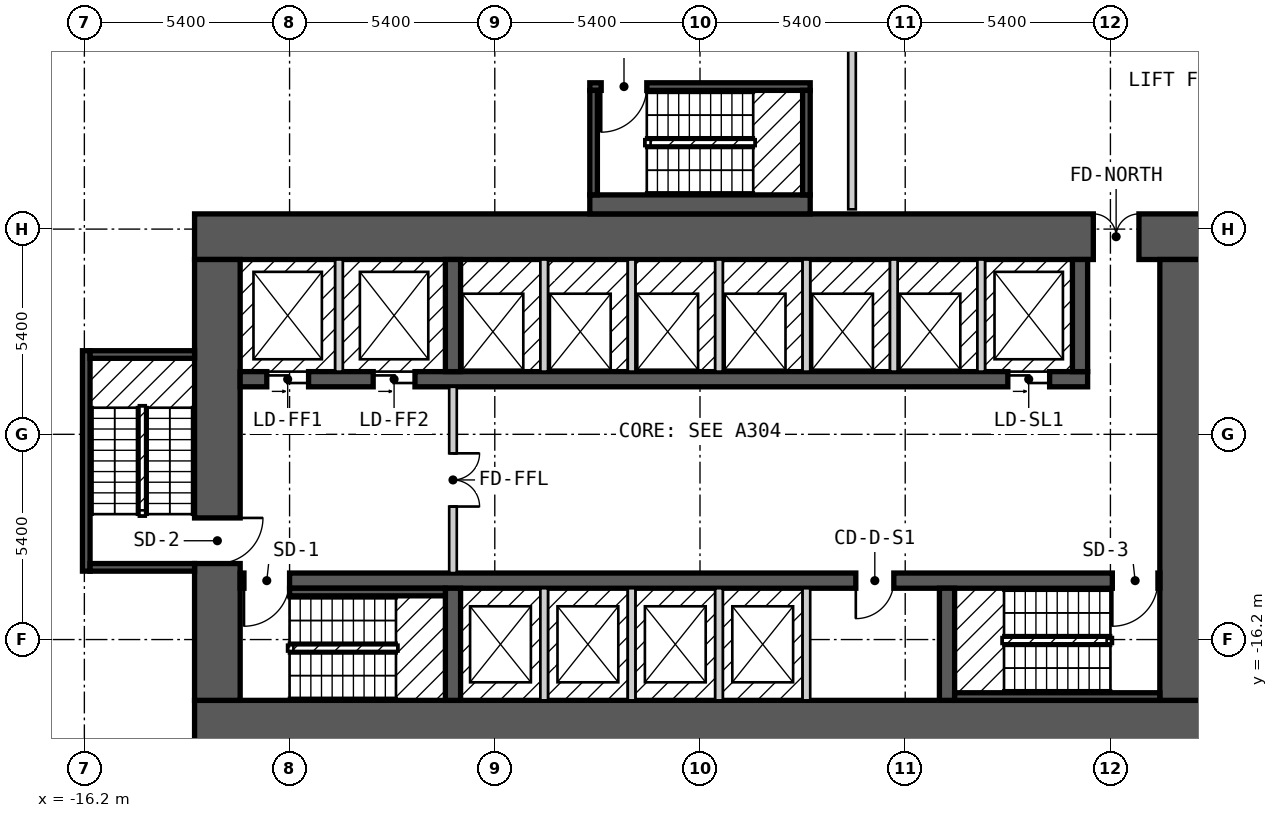
"""IFC4 building model, lengths in metres.
Left out: names, types, materials, properties, quantities, classifications, styles, units other than length and angle.
Written with IfcOpenShell. Run it as: python <this file> out.ifc"""

import sys

from ifc_helpers import new_model, si_unit, direction, frame, frame_2d, origin, place, context, subcontext, project, spatial, rectangle, extrude, element, fill, save


model = new_model("IFC4")
c1 = context("Model", 3, precision=1e-05, world=origin(), true_north=direction((0.0, 1.0)))
c2 = subcontext(c1, "Body", "Model", "MODEL_VIEW")
j1 = project(units=[si_unit("LENGTHUNIT", "METRE"), si_unit("PLANEANGLEUNIT", "RADIAN")], contexts=[c1])
p1 = place(None, origin())
s1 = spatial("IfcSite", under=j1, at=p1, CompositionType="ELEMENT")
p2 = place(p1, origin())
s2 = spatial("IfcBuilding", under=s1, at=p2, CompositionType="ELEMENT")
p3 = place(p2, frame((0.0, 0.0, 5.0)))
s3 = spatial("IfcBuildingStorey", under=s2, at=p3, CompositionType="ELEMENT", Elevation=5.0)
p4 = place(p3, frame((-13.3, -18.4, 0.0), z_axis=(0.0, 0.0, 1.0), x_axis=(1.0, 0.0, 0.0)))
e1 = element("IfcWall", 1, at=p4, inside=s3, PredefinedType="SHEAR", context=c2, shape_type="SweptSolid", body=[
    extrude(rectangle(XDim=26.6, YDim=1.2, at=frame_2d((13.3, 0.0))), origin(), (0.0, 0.0, 1.0), 3.5),
])
p5 = place(p3, frame((-13.3, -5.6, 0.0), z_axis=(0.0, 0.0, 1.0), x_axis=(1.0, 0.0, 0.0)))
e2 = element("IfcWall", 2, at=p5, inside=s3, PredefinedType="SHEAR", context=c2, shape_type="SweptSolid", body=[
    extrude(rectangle(XDim=26.6, YDim=1.2, at=frame_2d((13.3, 0.0))), origin(), (0.0, 0.0, 1.0), 3.5),
])
p6 = place(p5, frame((23.65, 0.0, 0.0)))
e3 = element("IfcOpeningElement", 3, at=p6, cuts=e2, PredefinedType="OPENING", context=c2, shape_type="SweptSolid", body=[
    extrude(rectangle(XDim=1.2, YDim=2.1, at=frame_2d((0.6, 1.05))), frame((0.0, 0.61, 0.0), z_axis=(0.0, -1.0, 0.0), x_axis=(1.0, 0.0, 0.0)), (0.0, 0.0, 1.0), 1.22),
])
p7 = place(p3, frame((-12.7, -17.8, 0.0), z_axis=(0.0, 0.0, 1.0), x_axis=(0.0, 1.0, 0.0)))
e4 = element("IfcWall", 4, at=p7, inside=s3, PredefinedType="SHEAR", context=c2, shape_type="SweptSolid", body=[
    extrude(rectangle(XDim=11.6, YDim=1.2, at=frame_2d((5.8, 0.0))), origin(), (0.0, 0.0, 1.0), 3.5),
])
p8 = place(p7, frame((3.6, 0.0, 0.0)))
e5 = element("IfcOpeningElement", 5, at=p8, cuts=e4, PredefinedType="OPENING", context=c2, shape_type="SweptSolid", body=[
    extrude(rectangle(XDim=1.2, YDim=2.1, at=frame_2d((0.6, 1.05))), frame((0.0, 0.61, 0.0), z_axis=(0.0, -1.0, 0.0), x_axis=(1.0, 0.0, 0.0)), (0.0, 0.0, 1.0), 1.22),
])
p9 = place(p3, frame((12.7, -17.8, 0.0), z_axis=(0.0, 0.0, 1.0), x_axis=(0.0, 1.0, 0.0)))
e6 = element("IfcWall", 6, at=p9, inside=s3, PredefinedType="SHEAR", context=c2, shape_type="SweptSolid", body=[
    extrude(rectangle(XDim=11.6, YDim=1.2, at=frame_2d((5.8, 0.0))), origin(), (0.0, 0.0, 1.0), 3.5),
])
p10 = place(p3, frame((-12.1, -14.65, 0.0), z_axis=(0.0, 0.0, 1.0), x_axis=(1.0, 0.0, 0.0)))
e7 = element("IfcWall", 7, at=p10, inside=s3, PredefinedType="SHEAR", context=c2, shape_type="SweptSolid", body=[
    extrude(rectangle(XDim=24.2, YDim=0.4, at=frame_2d((12.1, 0.0))), origin(), (0.0, 0.0, 1.0), 3.5),
])
p11 = place(p10, frame((1.3, 0.0, 0.0), z_axis=(0.0, 0.0, 1.0), x_axis=(-1.0, 0.0, 0.0)))
e8 = element("IfcOpeningElement", 8, at=p11, cuts=e7, PredefinedType="OPENING", context=c2, shape_type="SweptSolid", body=[
    extrude(rectangle(XDim=1.2, YDim=2.1, at=frame_2d((0.6, 1.05))), frame((0.0, 0.21, 0.0), z_axis=(0.0, -1.0, 0.0), x_axis=(1.0, 0.0, 0.0)), (0.0, 0.0, 1.0), 0.42),
])
p12 = place(p10, frame((24.15, 0.0, 0.0), z_axis=(0.0, 0.0, 1.0), x_axis=(-1.0, 0.0, 0.0)))
e9 = element("IfcOpeningElement", 9, at=p12, cuts=e7, PredefinedType="OPENING", context=c2, shape_type="SweptSolid", body=[
    extrude(rectangle(XDim=1.2, YDim=2.1, at=frame_2d((0.6, 1.05))), frame((0.0, 0.21, 0.0), z_axis=(0.0, -1.0, 0.0), x_axis=(1.0, 0.0, 0.0)), (0.0, 0.0, 1.0), 0.42),
])
p13 = place(p10, frame((17.2, 0.0, 0.0), z_axis=(0.0, 0.0, 1.0), x_axis=(-1.0, 0.0, 0.0)))
e10 = element("IfcOpeningElement", 10, at=p13, cuts=e7, PredefinedType="OPENING", context=c2, shape_type="SweptSolid", body=[
    extrude(rectangle(XDim=1.0, YDim=2.1, at=frame_2d((0.5, 1.05))), frame((0.0, 0.21, 0.0), z_axis=(0.0, -1.0, 0.0), x_axis=(1.0, 0.0, 0.0)), (0.0, 0.0, 1.0), 0.42),
])
p14 = place(p3, frame((-12.1, -9.35, 0.0), z_axis=(0.0, 0.0, 1.0), x_axis=(1.0, 0.0, 0.0)))
e11 = element("IfcWall", 11, at=p14, inside=s3, PredefinedType="SHEAR", context=c2, shape_type="SweptSolid", body=[
    extrude(rectangle(XDim=22.3, YDim=0.4, at=frame_2d((11.15, 0.0))), origin(), (0.0, 0.0, 1.0), 3.5),
])
p15 = place(p14, frame((0.7, 0.0, 0.0)))
e12 = element("IfcOpeningElement", 12, at=p15, cuts=e11, PredefinedType="OPENING", context=c2, shape_type="SweptSolid", body=[
    extrude(rectangle(XDim=1.1, YDim=2.1, at=frame_2d((0.55, 1.05))), frame((0.0, 0.21, 0.0), z_axis=(0.0, -1.0, 0.0), x_axis=(1.0, 0.0, 0.0)), (0.0, 0.0, 1.0), 0.42),
])
p16 = place(p14, frame((3.5, 0.0, 0.0)))
e13 = element("IfcOpeningElement", 13, at=p16, cuts=e11, PredefinedType="OPENING", context=c2, shape_type="SweptSolid", body=[
    extrude(rectangle(XDim=1.1, YDim=2.1, at=frame_2d((0.55, 1.05))), frame((0.0, 0.21, 0.0), z_axis=(0.0, -1.0, 0.0), x_axis=(1.0, 0.0, 0.0)), (0.0, 0.0, 1.0), 0.42),
])
p17 = place(p14, frame((20.2, 0.0, 0.0)))
e14 = element("IfcOpeningElement", 14, at=p17, cuts=e11, PredefinedType="OPENING", context=c2, shape_type="SweptSolid", body=[
    extrude(rectangle(XDim=1.1, YDim=2.1, at=frame_2d((0.55, 1.05))), frame((0.0, 0.21, 0.0), z_axis=(0.0, -1.0, 0.0), x_axis=(1.0, 0.0, 0.0)), (0.0, 0.0, 1.0), 0.42),
])
for number, where, z_axis, x_axis in (
    (15, (-6.5, -17.8, 0.0), (0.0, 0.0, 1.0), (0.0, 1.0, 0.0)),
    (16, (6.5, -17.8, 0.0), (0.0, 0.0, 1.0), (0.0, 1.0, 0.0)),
    (17, (-6.5, -9.15, 0.0), (0.0, 0.0, 1.0), (0.0, 1.0, 0.0)),
    (18, (10.0, -9.15, 0.0), (0.0, 0.0, 1.0), (0.0, 1.0, 0.0)),
):
    element("IfcWall", number, at=place(p3, frame(where, z_axis=z_axis, x_axis=x_axis)), inside=s3, PredefinedType="SHEAR", context=c2, shape_type="SweptSolid", body=[
        extrude(rectangle(XDim=2.95, YDim=0.4, at=frame_2d((1.475, 0.0))), origin(), (0.0, 0.0, 1.0), 3.5),
    ])
p18 = place(p3, frame((-2.9, -4.75, 0.0), z_axis=(0.0, 0.0, 1.0), x_axis=(1.0, 0.0, 0.0)))
e19 = element("IfcWall", 19, at=p18, inside=s3, PredefinedType="SOLIDWALL", context=c2, shape_type="SweptSolid", body=[
    extrude(rectangle(XDim=5.8, YDim=0.5, at=frame_2d((2.9, 0.0))), origin(), (0.0, 0.0, 1.0), 3.5),
])
p19 = place(p3, frame((-2.9, -1.65, 0.0), z_axis=(0.0, 0.0, 1.0), x_axis=(1.0, 0.0, 0.0)))
e20 = element("IfcWall", 20, at=p19, inside=s3, PredefinedType="SOLIDWALL", context=c2, shape_type="SweptSolid", body=[
    extrude(rectangle(XDim=5.8, YDim=0.2, at=frame_2d((2.9, 0.0))), origin(), (0.0, 0.0, 1.0), 3.5),
])
p20 = place(p19, frame((0.3, 0.0, 0.0)))
e21 = element("IfcOpeningElement", 21, at=p20, cuts=e20, PredefinedType="OPENING", context=c2, shape_type="SweptSolid", body=[
    extrude(rectangle(XDim=1.2, YDim=2.1, at=frame_2d((0.6, 1.05))), frame((0.0, 0.11, 0.0), z_axis=(0.0, -1.0, 0.0), x_axis=(1.0, 0.0, 0.0)), (0.0, 0.0, 1.0), 0.22),
])
for number, where, z_axis, x_axis in (
    (22, (-2.8, -4.5, 0.0), (0.0, 0.0, 1.0), (0.0, 1.0, 0.0)),
    (23, (2.8, -4.5, 0.0), (0.0, 0.0, 1.0), (0.0, 1.0, 0.0)),
):
    element("IfcWall", number, at=place(p3, frame(where, z_axis=z_axis, x_axis=x_axis)), inside=s3, PredefinedType="SOLIDWALL", context=c2, shape_type="SweptSolid", body=[
        extrude(rectangle(XDim=2.75, YDim=0.2, at=frame_2d((1.375, 0.0))), origin(), (0.0, 0.0, 1.0), 3.5),
    ])
p21 = place(p3, frame((4.0, -4.88, 0.0), z_axis=(0.0, 0.0, 1.0), x_axis=(0.0, 1.0, 0.0)))
e24 = element("IfcWall", 24, at=p21, inside=s3, PredefinedType="PARTITIONING", context=c2, shape_type="SweptSolid", body=[
    extrude(rectangle(XDim=6.78, YDim=0.2, at=frame_2d((3.39, 0.0))), origin(), (0.0, 0.0, 1.0), 3.5),
])
p22 = place(p3, frame((-16.15, -14.4, 0.0), z_axis=(0.0, 0.0, 1.0), x_axis=(0.0, 1.0, 0.0)))
e25 = element("IfcWall", 25, at=p22, inside=s3, PredefinedType="SOLIDWALL", context=c2, shape_type="SweptSolid", body=[
    extrude(rectangle(XDim=5.8, YDim=0.2, at=frame_2d((2.9, 0.0))), origin(), (0.0, 0.0, 1.0), 3.5),
])
for number, where, z_axis, x_axis in (
    (26, (-16.05, -14.3, 0.0), (0.0, 0.0, 1.0), (1.0, 0.0, 0.0)),
    (27, (-16.05, -8.7, 0.0), (0.0, 0.0, 1.0), (1.0, 0.0, 0.0)),
):
    element("IfcWall", number, at=place(p3, frame(where, z_axis=z_axis, x_axis=x_axis)), inside=s3, PredefinedType="SOLIDWALL", context=c2, shape_type="SweptSolid", body=[
        extrude(rectangle(XDim=2.75, YDim=0.2, at=frame_2d((1.375, 0.0))), origin(), (0.0, 0.0, 1.0), 3.5),
    ])
p23 = place(p3, frame((-10.8, -14.95, 0.0), z_axis=(0.0, 0.0, 1.0), x_axis=(1.0, 0.0, 0.0)))
e28 = element("IfcWall", 28, at=p23, inside=s3, PredefinedType="SOLIDWALL", context=c2, shape_type="SweptSolid", body=[
    extrude(rectangle(XDim=4.1, YDim=0.2, at=frame_2d((2.05, 0.0))), origin(), (0.0, 0.0, 1.0), 3.5),
])
p24 = place(p3, frame((-9.5, -9.15, 0.0), z_axis=(0.0, 0.0, 1.0), x_axis=(0.0, 1.0, 0.0)))
e29 = element("IfcWall", 29, at=p24, inside=s3, PredefinedType="SOLIDWALL", context=c2, shape_type="SweptSolid", body=[
    extrude(rectangle(XDim=2.95, YDim=0.2, at=frame_2d((1.475, 0.0))), origin(), (0.0, 0.0, 1.0), 3.5),
])
p25 = place(p3, frame((-6.5, -14.45, 0.0), z_axis=(0.0, 0.0, 1.0), x_axis=(0.0, 1.0, 0.0)))
e30 = element("IfcWall", 30, at=p25, inside=s3, PredefinedType="PARTITIONING", context=c2, shape_type="SweptSolid", body=[
    extrude(rectangle(XDim=4.9, YDim=0.2, at=frame_2d((2.45, 0.0))), origin(), (0.0, 0.0, 1.0), 3.5),
])
p26 = place(p25, frame((3.15, 0.0, 0.0), z_axis=(0.0, 0.0, 1.0), x_axis=(-1.0, 0.0, 0.0)))
e31 = element("IfcOpeningElement", 31, at=p26, cuts=e30, PredefinedType="OPENING", context=c2, shape_type="SweptSolid", body=[
    extrude(rectangle(XDim=1.4, YDim=2.1, at=frame_2d((0.7, 1.05))), frame((0.0, 0.11, 0.0), z_axis=(0.0, -1.0, 0.0), x_axis=(1.0, 0.0, 0.0)), (0.0, 0.0, 1.0), 0.22),
])
for number, where, z_axis, x_axis in (
    (32, (-4.1, -17.8, 0.0), (0.0, 0.0, 1.0), (0.0, 1.0, 0.0)),
    (33, (-4.1, -9.15, 0.0), (0.0, 0.0, 1.0), (0.0, 1.0, 0.0)),
    (34, (-1.8, -17.8, 0.0), (0.0, 0.0, 1.0), (0.0, 1.0, 0.0)),
    (35, (-1.8, -9.15, 0.0), (0.0, 0.0, 1.0), (0.0, 1.0, 0.0)),
    (36, (0.5, -17.8, 0.0), (0.0, 0.0, 1.0), (0.0, 1.0, 0.0)),
    (37, (0.5, -9.15, 0.0), (0.0, 0.0, 1.0), (0.0, 1.0, 0.0)),
    (38, (2.8, -17.8, 0.0), (0.0, 0.0, 1.0), (0.0, 1.0, 0.0)),
    (39, (2.8, -9.15, 0.0), (0.0, 0.0, 1.0), (0.0, 1.0, 0.0)),
    (40, (5.1, -9.15, 0.0), (0.0, 0.0, 1.0), (0.0, 1.0, 0.0)),
):
    element("IfcWall", number, at=place(p3, frame(where, z_axis=z_axis, x_axis=x_axis)), inside=s3, PredefinedType="SOLIDWALL", context=c2, shape_type="SweptSolid", body=[
        extrude(rectangle(XDim=2.95, YDim=0.2, at=frame_2d((1.475, 0.0))), origin(), (0.0, 0.0, 1.0), 3.5),
    ])
p27 = place(p3, frame((6.7, -17.7, 0.0), z_axis=(0.0, 0.0, 1.0), x_axis=(1.0, 0.0, 0.0)))
e41 = element("IfcWall", 41, at=p27, inside=s3, PredefinedType="SOLIDWALL", context=c2, shape_type="SweptSolid", body=[
    extrude(rectangle(XDim=5.4, YDim=0.2, at=frame_2d((2.7, 0.0))), origin(), (0.0, 0.0, 1.0), 3.5),
])
p28 = place(p3, frame((7.4, -9.15, 0.0), z_axis=(0.0, 0.0, 1.0), x_axis=(0.0, 1.0, 0.0)))
e42 = element("IfcWall", 42, at=p28, inside=s3, PredefinedType="SOLIDWALL", context=c2, shape_type="SweptSolid", body=[
    extrude(rectangle(XDim=2.95, YDim=0.2, at=frame_2d((1.475, 0.0))), origin(), (0.0, 0.0, 1.0), 3.5),
])
p29 = place(p20, origin())
e43 = element("IfcDoor", 43, at=p29, inside=s3, OperationType="SINGLE_SWING_LEFT", PredefinedType="DOOR", context=c2, shape_type="SweptSolid", body=[
    extrude(rectangle(XDim=1.2, YDim=2.1, at=frame_2d((0.6, 1.05))), frame((0.0, 0.025, 0.0), z_axis=(0.0, -1.0, 0.0), x_axis=(1.0, 0.0, 0.0)), (0.0, 0.0, 1.0), 0.05),
])
fill(e21, e43)
p30 = place(p15, origin())
e44 = element("IfcDoor", 44, at=p30, inside=s3, OperationType="DOUBLE_DOOR_SLIDING", PredefinedType="DOOR", context=c2, shape_type="SweptSolid", body=[
    extrude(rectangle(XDim=1.1, YDim=2.1, at=frame_2d((0.55, 1.05))), frame((0.0, 0.025, 0.0), z_axis=(0.0, -1.0, 0.0), x_axis=(1.0, 0.0, 0.0)), (0.0, 0.0, 1.0), 0.05),
])
fill(e12, e44)
p31 = place(p16, origin())
e45 = element("IfcDoor", 45, at=p31, inside=s3, OperationType="DOUBLE_DOOR_SLIDING", PredefinedType="DOOR", context=c2, shape_type="SweptSolid", body=[
    extrude(rectangle(XDim=1.1, YDim=2.1, at=frame_2d((0.55, 1.05))), frame((0.0, 0.025, 0.0), z_axis=(0.0, -1.0, 0.0), x_axis=(1.0, 0.0, 0.0)), (0.0, 0.0, 1.0), 0.05),
])
fill(e13, e45)
p32 = place(p17, origin())
e46 = element("IfcDoor", 46, at=p32, inside=s3, OperationType="DOUBLE_DOOR_SLIDING", PredefinedType="DOOR", context=c2, shape_type="SweptSolid", body=[
    extrude(rectangle(XDim=1.1, YDim=2.1, at=frame_2d((0.55, 1.05))), frame((0.0, 0.025, 0.0), z_axis=(0.0, -1.0, 0.0), x_axis=(1.0, 0.0, 0.0)), (0.0, 0.0, 1.0), 0.05),
])
fill(e14, e46)
p33 = place(p11, origin())
e47 = element("IfcDoor", 47, at=p33, inside=s3, OperationType="SINGLE_SWING_RIGHT", PredefinedType="DOOR", context=c2, shape_type="SweptSolid", body=[
    extrude(rectangle(XDim=1.2, YDim=2.1, at=frame_2d((0.6, 1.05))), frame((0.0, 0.025, 0.0), z_axis=(0.0, -1.0, 0.0), x_axis=(1.0, 0.0, 0.0)), (0.0, 0.0, 1.0), 0.05),
])
fill(e8, e47)
p34 = place(p12, origin())
e48 = element("IfcDoor", 48, at=p34, inside=s3, OperationType="SINGLE_SWING_RIGHT", PredefinedType="DOOR", context=c2, shape_type="SweptSolid", body=[
    extrude(rectangle(XDim=1.2, YDim=2.1, at=frame_2d((0.6, 1.05))), frame((0.0, 0.025, 0.0), z_axis=(0.0, -1.0, 0.0), x_axis=(1.0, 0.0, 0.0)), (0.0, 0.0, 1.0), 0.05),
])
fill(e9, e48)
p35 = place(p8, origin())
e49 = element("IfcDoor", 49, at=p35, inside=s3, OperationType="SINGLE_SWING_RIGHT", PredefinedType="DOOR", context=c2, shape_type="SweptSolid", body=[
    extrude(rectangle(XDim=1.2, YDim=2.1, at=frame_2d((0.6, 1.05))), frame((0.0, 0.025, 0.0), z_axis=(0.0, -1.0, 0.0), x_axis=(1.0, 0.0, 0.0)), (0.0, 0.0, 1.0), 0.05),
])
fill(e5, e49)
p36 = place(p26, origin())
e50 = element("IfcDoor", 50, at=p36, inside=s3, OperationType="DOUBLE_DOOR_SINGLE_SWING", PredefinedType="DOOR", context=c2, shape_type="SweptSolid", body=[
    extrude(rectangle(XDim=1.4, YDim=2.1, at=frame_2d((0.7, 1.05))), frame((0.0, 0.025, 0.0), z_axis=(0.0, -1.0, 0.0), x_axis=(1.0, 0.0, 0.0)), (0.0, 0.0, 1.0), 0.05),
])
fill(e31, e50)
p37 = place(p6, origin())
e51 = element("IfcDoor", 51, at=p37, inside=s3, OperationType="DOUBLE_DOOR_SINGLE_SWING", PredefinedType="DOOR", context=c2, shape_type="SweptSolid", body=[
    extrude(rectangle(XDim=1.2, YDim=2.1, at=frame_2d((0.6, 1.05))), frame((0.0, 0.025, 0.0), z_axis=(0.0, -1.0, 0.0), x_axis=(1.0, 0.0, 0.0)), (0.0, 0.0, 1.0), 0.05),
])
fill(e3, e51)
p38 = place(p13, origin())
e52 = element("IfcDoor", 52, at=p38, inside=s3, OperationType="SINGLE_SWING_RIGHT", PredefinedType="DOOR", context=c2, shape_type="SweptSolid", body=[
    extrude(rectangle(XDim=1.0, YDim=2.1, at=frame_2d((0.5, 1.05))), frame((0.0, 0.025, 0.0), z_axis=(0.0, -1.0, 0.0), x_axis=(1.0, 0.0, 0.0)), (0.0, 0.0, 1.0), 0.05),
])
fill(e10, e52)
save(model, sys.argv[1])
